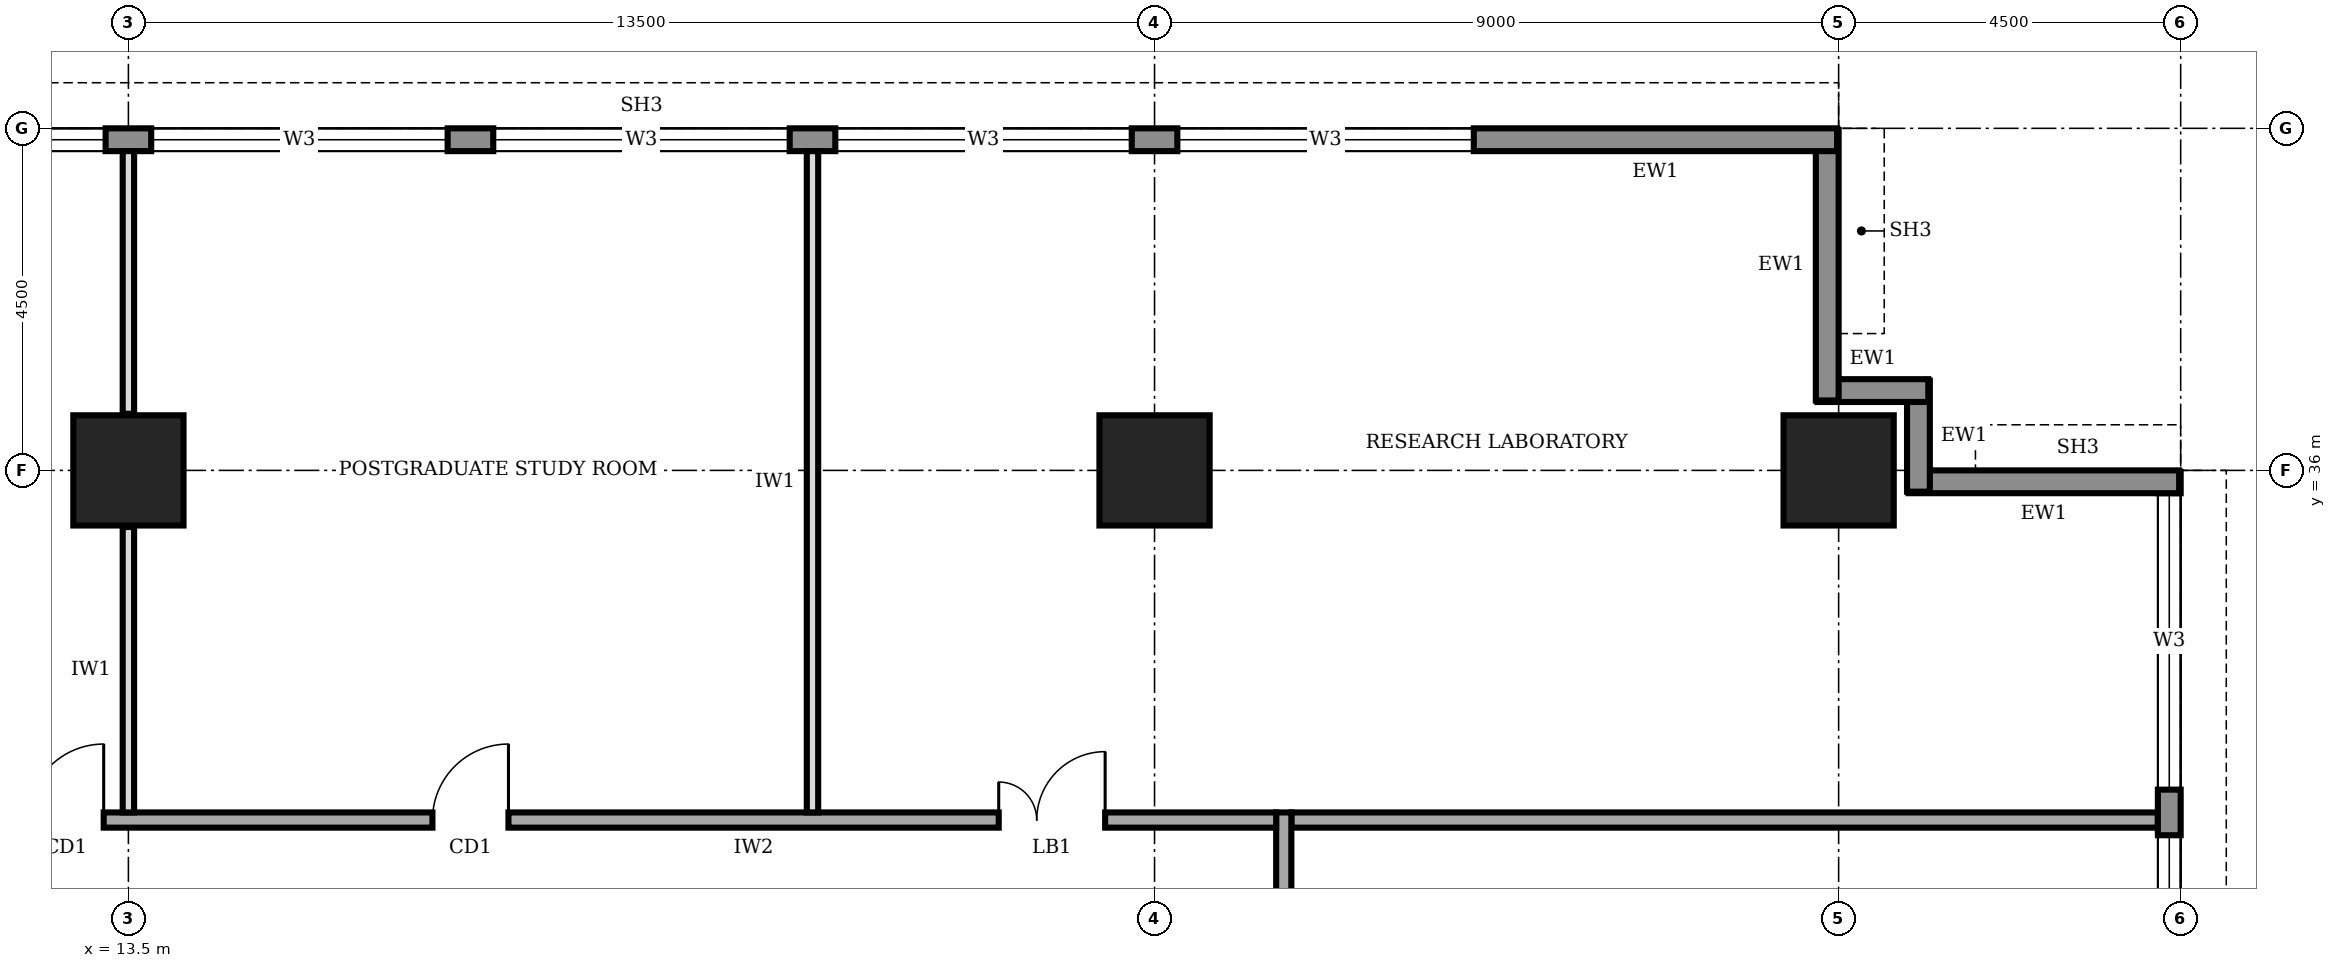
"""IFC4 building model, lengths in metres.
Left out: names, types, materials, properties, quantities, classifications, styles, units other than length and angle.
Written with IfcOpenShell. Run it as: python <this file> out.ifc"""

import sys

from ifc_helpers import new_model, si_unit, direction, frame, frame_2d, origin, origin_2d, place, context, subcontext, project, spatial, rectangle, extrude, element, fill, save


model = new_model("IFC4")
c1 = context("Model", 3, precision=1e-05, world=origin(), true_north=direction((0.0, 1.0)))
c2 = subcontext(c1, "Body", "Model", "MODEL_VIEW")
j1 = project(units=[si_unit("LENGTHUNIT", "METRE"), si_unit("PLANEANGLEUNIT", "RADIAN")], contexts=[c1])
p1 = place(None, origin())
s1 = spatial("IfcSite", under=j1, at=p1, CompositionType="ELEMENT")
p2 = place(p1, origin())
s2 = spatial("IfcBuilding", under=s1, at=p2, CompositionType="ELEMENT")
p3 = place(p2, frame((0.0, 0.0, 261.0)))
s3 = spatial("IfcBuildingStorey", under=s2, at=p3, CompositionType="ELEMENT", Elevation=261.0)
for number, where, z_axis, x_axis in (
    (1, (13.5, 36.0, 0.0), (0.0, 0.0, 1.0), (1.0, 0.0, 0.0)),
    (2, (27.0, 36.0, 0.0), (0.0, 0.0, 1.0), (1.0, 0.0, 0.0)),
    (3, (36.0, 36.0, 0.0), (0.0, 0.0, 1.0), (1.0, 0.0, 0.0)),
):
    element("IfcColumn", number, at=place(p3, frame(where, z_axis=z_axis, x_axis=x_axis)), inside=s3, PredefinedType="COLUMN", context=c2, shape_type="SweptSolid", body=[
        extrude(rectangle(XDim=1.45, YDim=1.45, at=origin_2d()), origin(), (0.0, 0.0, 1.0), 4.0),
    ])
p4 = place(p3, frame((40.35, 4.52, 0.0), z_axis=(0.0, 0.0, 1.0), x_axis=(0.0, 1.0, 0.0)))
e4 = element("IfcWall", 4, at=p4, inside=s3, PredefinedType="STANDARD", context=c2, shape_type="SweptSolid", body=[
    extrude(rectangle(XDim=31.46, YDim=0.3, at=frame_2d((15.73, 0.0))), origin(), (0.0, 0.0, 1.0), 3.75),
])
p5 = place(p4, frame((4.78, 0.0, 0.95)))
e5 = element("IfcOpeningElement", 5, at=p5, cuts=e4, PredefinedType="OPENING", context=c2, shape_type="SweptSolid", body=[
    extrude(rectangle(XDim=3.9, YDim=1.8, at=frame_2d((1.95, 0.9))), frame((0.0, 0.16, 0.0), z_axis=(0.0, -1.0, 0.0), x_axis=(1.0, 0.0, 0.0)), (0.0, 0.0, 1.0), 0.32),
])
p6 = place(p4, frame((9.28, 0.0, 0.95)))
e6 = element("IfcOpeningElement", 6, at=p6, cuts=e4, PredefinedType="OPENING", context=c2, shape_type="SweptSolid", body=[
    extrude(rectangle(XDim=3.9, YDim=1.8, at=frame_2d((1.95, 0.9))), frame((0.0, 0.16, 0.0), z_axis=(0.0, -1.0, 0.0), x_axis=(1.0, 0.0, 0.0)), (0.0, 0.0, 1.0), 0.32),
])
p7 = place(p4, frame((13.78, 0.0, 0.95)))
e7 = element("IfcOpeningElement", 7, at=p7, cuts=e4, PredefinedType="OPENING", context=c2, shape_type="SweptSolid", body=[
    extrude(rectangle(XDim=3.9, YDim=1.8, at=frame_2d((1.95, 0.9))), frame((0.0, 0.16, 0.0), z_axis=(0.0, -1.0, 0.0), x_axis=(1.0, 0.0, 0.0)), (0.0, 0.0, 1.0), 0.32),
])
p8 = place(p4, frame((18.28, 0.0, 0.95)))
e8 = element("IfcOpeningElement", 8, at=p8, cuts=e4, PredefinedType="OPENING", context=c2, shape_type="SweptSolid", body=[
    extrude(rectangle(XDim=3.9, YDim=1.8, at=frame_2d((1.95, 0.9))), frame((0.0, 0.16, 0.0), z_axis=(0.0, -1.0, 0.0), x_axis=(1.0, 0.0, 0.0)), (0.0, 0.0, 1.0), 0.32),
])
p9 = place(p4, frame((22.78, 0.0, 0.95)))
e9 = element("IfcOpeningElement", 9, at=p9, cuts=e4, PredefinedType="OPENING", context=c2, shape_type="SweptSolid", body=[
    extrude(rectangle(XDim=3.9, YDim=1.8, at=frame_2d((1.95, 0.9))), frame((0.0, 0.16, 0.0), z_axis=(0.0, -1.0, 0.0), x_axis=(1.0, 0.0, 0.0)), (0.0, 0.0, 1.0), 0.32),
])
p10 = place(p4, frame((27.28, 0.0, 0.95)))
e10 = element("IfcOpeningElement", 10, at=p10, cuts=e4, PredefinedType="OPENING", context=c2, shape_type="SweptSolid", body=[
    extrude(rectangle(XDim=3.9, YDim=1.8, at=frame_2d((1.95, 0.9))), frame((0.0, 0.16, 0.0), z_axis=(0.0, -1.0, 0.0), x_axis=(1.0, 0.0, 0.0)), (0.0, 0.0, 1.0), 0.32),
])
p11 = place(p3, frame((40.48, 35.85, 0.0), z_axis=(0.0, 0.0, 1.0), x_axis=(-1.0, 0.0, 0.0)))
e11 = element("IfcWall", 11, at=p11, inside=s3, PredefinedType="STANDARD", context=c2, shape_type="SweptSolid", body=[
    extrude(rectangle(XDim=3.56, YDim=0.3, at=frame_2d((1.78, 0.0))), origin(), (0.0, 0.0, 1.0), 2.85),
])
for number, where, z_axis, x_axis in (
    (12, (37.05, 35.72, 0.0), (0.0, 0.0, 1.0), (0.0, 1.0, 0.0)),
    (13, (37.18, 37.05, 0.0), (0.0, 0.0, 1.0), (-1.0, 0.0, 0.0)),
):
    element("IfcWall", number, at=place(p3, frame(where, z_axis=z_axis, x_axis=x_axis)), inside=s3, PredefinedType="STANDARD", context=c2, shape_type="SweptSolid", body=[
        extrude(rectangle(XDim=1.46, YDim=0.3, at=frame_2d((0.73, 0.0))), origin(), (0.0, 0.0, 1.0), 3.75),
    ])
p12 = place(p3, frame((35.85, 36.92, 0.0), z_axis=(0.0, 0.0, 1.0), x_axis=(0.0, 1.0, 0.0)))
e14 = element("IfcWall", 14, at=p12, inside=s3, PredefinedType="STANDARD", context=c2, shape_type="SweptSolid", body=[
    extrude(rectangle(XDim=3.56, YDim=0.3, at=frame_2d((1.78, 0.0))), origin(), (0.0, 0.0, 1.0), 2.85),
])
p13 = place(p3, frame((35.98, 40.35, 0.0), z_axis=(0.0, 0.0, 1.0), x_axis=(-1.0, 0.0, 0.0)))
e15 = element("IfcWall", 15, at=p13, inside=s3, PredefinedType="STANDARD", context=c2, shape_type="SweptSolid", body=[
    extrude(rectangle(XDim=31.46, YDim=0.3, at=frame_2d((15.73, 0.0))), origin(), (0.0, 0.0, 1.0), 3.75),
])
p14 = place(p13, frame((27.28, 0.0, 0.95)))
e16 = element("IfcOpeningElement", 16, at=p14, cuts=e15, PredefinedType="OPENING", context=c2, shape_type="SweptSolid", body=[
    extrude(rectangle(XDim=3.9, YDim=1.8, at=frame_2d((1.95, 0.9))), frame((0.0, 0.16, 0.0), z_axis=(0.0, -1.0, 0.0), x_axis=(1.0, 0.0, 0.0)), (0.0, 0.0, 1.0), 0.32),
])
p15 = place(p13, frame((22.78, 0.0, 0.95)))
e17 = element("IfcOpeningElement", 17, at=p15, cuts=e15, PredefinedType="OPENING", context=c2, shape_type="SweptSolid", body=[
    extrude(rectangle(XDim=3.9, YDim=1.8, at=frame_2d((1.95, 0.9))), frame((0.0, 0.16, 0.0), z_axis=(0.0, -1.0, 0.0), x_axis=(1.0, 0.0, 0.0)), (0.0, 0.0, 1.0), 0.32),
])
p16 = place(p13, frame((18.28, 0.0, 0.95)))
e18 = element("IfcOpeningElement", 18, at=p16, cuts=e15, PredefinedType="OPENING", context=c2, shape_type="SweptSolid", body=[
    extrude(rectangle(XDim=3.9, YDim=1.8, at=frame_2d((1.95, 0.9))), frame((0.0, 0.16, 0.0), z_axis=(0.0, -1.0, 0.0), x_axis=(1.0, 0.0, 0.0)), (0.0, 0.0, 1.0), 0.32),
])
p17 = place(p13, frame((13.78, 0.0, 0.95)))
e19 = element("IfcOpeningElement", 19, at=p17, cuts=e15, PredefinedType="OPENING", context=c2, shape_type="SweptSolid", body=[
    extrude(rectangle(XDim=3.9, YDim=1.8, at=frame_2d((1.95, 0.9))), frame((0.0, 0.16, 0.0), z_axis=(0.0, -1.0, 0.0), x_axis=(1.0, 0.0, 0.0)), (0.0, 0.0, 1.0), 0.32),
])
p18 = place(p13, frame((9.28, 0.0, 0.95)))
e20 = element("IfcOpeningElement", 20, at=p18, cuts=e15, PredefinedType="OPENING", context=c2, shape_type="SweptSolid", body=[
    extrude(rectangle(XDim=3.9, YDim=1.8, at=frame_2d((1.95, 0.9))), frame((0.0, 0.16, 0.0), z_axis=(0.0, -1.0, 0.0), x_axis=(1.0, 0.0, 0.0)), (0.0, 0.0, 1.0), 0.32),
])
p19 = place(p13, frame((4.78, 0.0, 0.95)))
e21 = element("IfcOpeningElement", 21, at=p19, cuts=e15, PredefinedType="OPENING", context=c2, shape_type="SweptSolid", body=[
    extrude(rectangle(XDim=3.9, YDim=1.8, at=frame_2d((1.95, 0.9))), frame((0.0, 0.16, 0.0), z_axis=(0.0, -1.0, 0.0), x_axis=(1.0, 0.0, 0.0)), (0.0, 0.0, 1.0), 0.32),
])
p20 = place(p3, frame((28.7, 9.2, 0.0), z_axis=(0.0, 0.0, 1.0), x_axis=(0.0, 1.0, 0.0)))
e22 = element("IfcWall", 22, at=p20, inside=s3, PredefinedType="SOLIDWALL", context=c2, shape_type="SweptSolid", body=[
    extrude(rectangle(XDim=22.3, YDim=0.2, at=frame_2d((11.15, 0.0))), origin(), (0.0, 0.0, 1.0), 3.75),
])
p21 = place(p20, frame((1.55, 0.0, 0.0)))
e23 = element("IfcOpeningElement", 23, at=p21, cuts=e22, PredefinedType="OPENING", context=c2, shape_type="SweptSolid", body=[
    extrude(rectangle(XDim=1.0, YDim=2.1, at=frame_2d((0.5, 1.05))), frame((0.0, 0.11, 0.0), z_axis=(0.0, -1.0, 0.0), x_axis=(1.0, 0.0, 0.0)), (0.0, 0.0, 1.0), 0.22),
])
p22 = place(p20, frame((6.05, 0.0, 0.0)))
e24 = element("IfcOpeningElement", 24, at=p22, cuts=e22, PredefinedType="OPENING", context=c2, shape_type="SweptSolid", body=[
    extrude(rectangle(XDim=1.0, YDim=2.1, at=frame_2d((0.5, 1.05))), frame((0.0, 0.11, 0.0), z_axis=(0.0, -1.0, 0.0), x_axis=(1.0, 0.0, 0.0)), (0.0, 0.0, 1.0), 0.22),
])
p23 = place(p20, frame((10.55, 0.0, 0.0)))
e25 = element("IfcOpeningElement", 25, at=p23, cuts=e22, PredefinedType="OPENING", context=c2, shape_type="SweptSolid", body=[
    extrude(rectangle(XDim=1.0, YDim=2.1, at=frame_2d((0.5, 1.05))), frame((0.0, 0.11, 0.0), z_axis=(0.0, -1.0, 0.0), x_axis=(1.0, 0.0, 0.0)), (0.0, 0.0, 1.0), 0.22),
])
p24 = place(p20, frame((15.05, 0.0, 0.0)))
e26 = element("IfcOpeningElement", 26, at=p24, cuts=e22, PredefinedType="OPENING", context=c2, shape_type="SweptSolid", body=[
    extrude(rectangle(XDim=1.0, YDim=2.1, at=frame_2d((0.5, 1.05))), frame((0.0, 0.11, 0.0), z_axis=(0.0, -1.0, 0.0), x_axis=(1.0, 0.0, 0.0)), (0.0, 0.0, 1.0), 0.22),
])
p25 = place(p20, frame((19.55, 0.0, 0.0)))
e27 = element("IfcOpeningElement", 27, at=p25, cuts=e22, PredefinedType="OPENING", context=c2, shape_type="SweptSolid", body=[
    extrude(rectangle(XDim=1.0, YDim=2.1, at=frame_2d((0.5, 1.05))), frame((0.0, 0.11, 0.0), z_axis=(0.0, -1.0, 0.0), x_axis=(1.0, 0.0, 0.0)), (0.0, 0.0, 1.0), 0.22),
])
p26 = place(p3, frame((28.6, 31.4, 0.0), z_axis=(0.0, 0.0, 1.0), x_axis=(-1.0, 0.0, 0.0)))
e28 = element("IfcWall", 28, at=p26, inside=s3, PredefinedType="SOLIDWALL", context=c2, shape_type="SweptSolid", body=[
    extrude(rectangle(XDim=16.9, YDim=0.2, at=frame_2d((8.45, 0.0))), origin(), (0.0, 0.0, 1.0), 3.75),
])
p27 = place(p26, frame((15.425, 0.0, 0.0)))
e29 = element("IfcOpeningElement", 29, at=p27, cuts=e28, PredefinedType="OPENING", context=c2, shape_type="SweptSolid", body=[
    extrude(rectangle(XDim=1.0, YDim=2.1, at=frame_2d((0.5, 1.05))), frame((0.0, 0.11, 0.0), z_axis=(0.0, -1.0, 0.0), x_axis=(1.0, 0.0, 0.0)), (0.0, 0.0, 1.0), 0.22),
])
p28 = place(p26, frame((10.1, 0.0, 0.0)))
e30 = element("IfcOpeningElement", 30, at=p28, cuts=e28, PredefinedType="OPENING", context=c2, shape_type="SweptSolid", body=[
    extrude(rectangle(XDim=1.0, YDim=2.1, at=frame_2d((0.5, 1.05))), frame((0.0, 0.11, 0.0), z_axis=(0.0, -1.0, 0.0), x_axis=(1.0, 0.0, 0.0)), (0.0, 0.0, 1.0), 0.22),
])
p29 = place(p26, frame((2.25, 0.0, 0.0)))
e31 = element("IfcOpeningElement", 31, at=p29, cuts=e28, PredefinedType="OPENING", context=c2, shape_type="SweptSolid", body=[
    extrude(rectangle(XDim=1.4, YDim=2.1, at=frame_2d((0.7, 1.05))), frame((0.0, 0.11, 0.0), z_axis=(0.0, -1.0, 0.0), x_axis=(1.0, 0.0, 0.0)), (0.0, 0.0, 1.0), 0.22),
])
p30 = place(p3, frame((28.8, 31.4, 0.0), z_axis=(0.0, 0.0, 1.0), x_axis=(1.0, 0.0, 0.0)))
e32 = element("IfcWall", 32, at=p30, inside=s3, PredefinedType="SOLIDWALL", context=c2, shape_type="SweptSolid", body=[
    extrude(rectangle(XDim=11.4, YDim=0.2, at=frame_2d((5.7, 0.0))), origin(), (0.0, 0.0, 1.0), 3.75),
])
p31 = place(p3, frame((13.5, 31.5, 0.0), z_axis=(0.0, 0.0, 1.0), x_axis=(0.0, 1.0, 0.0)))
e33 = element("IfcWall", 33, at=p31, inside=s3, PredefinedType="PARTITIONING", context=c2, shape_type="SweptSolid", body=[
    extrude(rectangle(XDim=3.755, YDim=0.15, at=frame_2d((1.877, 0.0))), origin(), (0.0, 0.0, 1.0), 2.85),
])
p32 = place(p3, frame((13.5, 36.745, 0.0), z_axis=(0.0, 0.0, 1.0), x_axis=(0.0, 1.0, 0.0)))
e34 = element("IfcWall", 34, at=p32, inside=s3, PredefinedType="PARTITIONING", context=c2, shape_type="SweptSolid", body=[
    extrude(rectangle(XDim=3.455, YDim=0.15, at=frame_2d((1.728, 0.0))), origin(), (0.0, 0.0, 1.0), 2.85),
])
p33 = place(p3, frame((22.5, 31.5, 0.0), z_axis=(0.0, 0.0, 1.0), x_axis=(0.0, 1.0, 0.0)))
e35 = element("IfcWall", 35, at=p33, inside=s3, PredefinedType="PARTITIONING", context=c2, shape_type="SweptSolid", body=[
    extrude(rectangle(XDim=8.7, YDim=0.15, at=frame_2d((4.35, 0.0))), origin(), (0.0, 0.0, 1.0), 3.75),
])
p34 = place(p9, origin())
e36 = element("IfcWindow", 36, at=p34, inside=s3, PartitioningType="SINGLE_PANEL", PredefinedType="WINDOW", context=c2, shape_type="SweptSolid", body=[
    extrude(rectangle(XDim=3.9, YDim=1.8, at=frame_2d((1.95, 0.9))), frame((0.0, 0.03, 0.0), z_axis=(0.0, -1.0, 0.0), x_axis=(1.0, 0.0, 0.0)), (0.0, 0.0, 1.0), 0.06),
])
fill(e9, e36)
p35 = place(p10, origin())
e37 = element("IfcWindow", 37, at=p35, inside=s3, PartitioningType="SINGLE_PANEL", PredefinedType="WINDOW", context=c2, shape_type="SweptSolid", body=[
    extrude(rectangle(XDim=3.9, YDim=1.8, at=frame_2d((1.95, 0.9))), frame((0.0, 0.03, 0.0), z_axis=(0.0, -1.0, 0.0), x_axis=(1.0, 0.0, 0.0)), (0.0, 0.0, 1.0), 0.06),
])
fill(e10, e37)
p36 = place(p15, origin())
e38 = element("IfcWindow", 38, at=p36, inside=s3, PartitioningType="SINGLE_PANEL", PredefinedType="WINDOW", context=c2, shape_type="SweptSolid", body=[
    extrude(rectangle(XDim=3.9, YDim=1.8, at=frame_2d((1.95, 0.9))), frame((0.0, 0.03, 0.0), z_axis=(0.0, -1.0, 0.0), x_axis=(1.0, 0.0, 0.0)), (0.0, 0.0, 1.0), 0.06),
])
fill(e17, e38)
p37 = place(p16, origin())
e39 = element("IfcWindow", 39, at=p37, inside=s3, PartitioningType="SINGLE_PANEL", PredefinedType="WINDOW", context=c2, shape_type="SweptSolid", body=[
    extrude(rectangle(XDim=3.9, YDim=1.8, at=frame_2d((1.95, 0.9))), frame((0.0, 0.03, 0.0), z_axis=(0.0, -1.0, 0.0), x_axis=(1.0, 0.0, 0.0)), (0.0, 0.0, 1.0), 0.06),
])
fill(e18, e39)
p38 = place(p17, origin())
e40 = element("IfcWindow", 40, at=p38, inside=s3, PartitioningType="SINGLE_PANEL", PredefinedType="WINDOW", context=c2, shape_type="SweptSolid", body=[
    extrude(rectangle(XDim=3.9, YDim=1.8, at=frame_2d((1.95, 0.9))), frame((0.0, 0.03, 0.0), z_axis=(0.0, -1.0, 0.0), x_axis=(1.0, 0.0, 0.0)), (0.0, 0.0, 1.0), 0.06),
])
fill(e19, e40)
p39 = place(p18, origin())
e41 = element("IfcWindow", 41, at=p39, inside=s3, PartitioningType="SINGLE_PANEL", PredefinedType="WINDOW", context=c2, shape_type="SweptSolid", body=[
    extrude(rectangle(XDim=3.9, YDim=1.8, at=frame_2d((1.95, 0.9))), frame((0.0, 0.03, 0.0), z_axis=(0.0, -1.0, 0.0), x_axis=(1.0, 0.0, 0.0)), (0.0, 0.0, 1.0), 0.06),
])
fill(e20, e41)
p40 = place(p19, origin())
e42 = element("IfcWindow", 42, at=p40, inside=s3, PartitioningType="SINGLE_PANEL", PredefinedType="WINDOW", context=c2, shape_type="SweptSolid", body=[
    extrude(rectangle(XDim=3.9, YDim=1.8, at=frame_2d((1.95, 0.9))), frame((0.0, 0.03, 0.0), z_axis=(0.0, -1.0, 0.0), x_axis=(1.0, 0.0, 0.0)), (0.0, 0.0, 1.0), 0.06),
])
fill(e21, e42)
p41 = place(p27, frame((1.0, 0.0, 0.0), z_axis=(0.0, 0.0, 1.0), x_axis=(-1.0, 0.0, 0.0)))
e43 = element("IfcDoor", 43, at=p41, inside=s3, OperationType="SINGLE_SWING_RIGHT", PredefinedType="DOOR", context=c2, shape_type="SweptSolid", body=[
    extrude(rectangle(XDim=1.0, YDim=2.1, at=frame_2d((0.5, 1.05))), frame((0.0, 0.025, 0.0), z_axis=(0.0, -1.0, 0.0), x_axis=(1.0, 0.0, 0.0)), (0.0, 0.0, 1.0), 0.05),
])
fill(e29, e43)
p42 = place(p28, frame((1.0, 0.0, 0.0), z_axis=(0.0, 0.0, 1.0), x_axis=(-1.0, 0.0, 0.0)))
e44 = element("IfcDoor", 44, at=p42, inside=s3, OperationType="SINGLE_SWING_RIGHT", PredefinedType="DOOR", context=c2, shape_type="SweptSolid", body=[
    extrude(rectangle(XDim=1.0, YDim=2.1, at=frame_2d((0.5, 1.05))), frame((0.0, 0.025, 0.0), z_axis=(0.0, -1.0, 0.0), x_axis=(1.0, 0.0, 0.0)), (0.0, 0.0, 1.0), 0.05),
])
fill(e30, e44)
p43 = place(p29, frame((1.4, 0.0, 0.0), z_axis=(0.0, 0.0, 1.0), x_axis=(-1.0, 0.0, 0.0)))
e45 = element("IfcDoor", 45, at=p43, inside=s3, OperationType="DOUBLE_DOOR_SINGLE_SWING", PredefinedType="DOOR", context=c2, shape_type="SweptSolid", body=[
    extrude(rectangle(XDim=1.4, YDim=2.1, at=frame_2d((0.7, 1.05))), frame((0.0, 0.025, 0.0), z_axis=(0.0, -1.0, 0.0), x_axis=(1.0, 0.0, 0.0)), (0.0, 0.0, 1.0), 0.05),
])
fill(e31, e45)
save(model, sys.argv[1])
